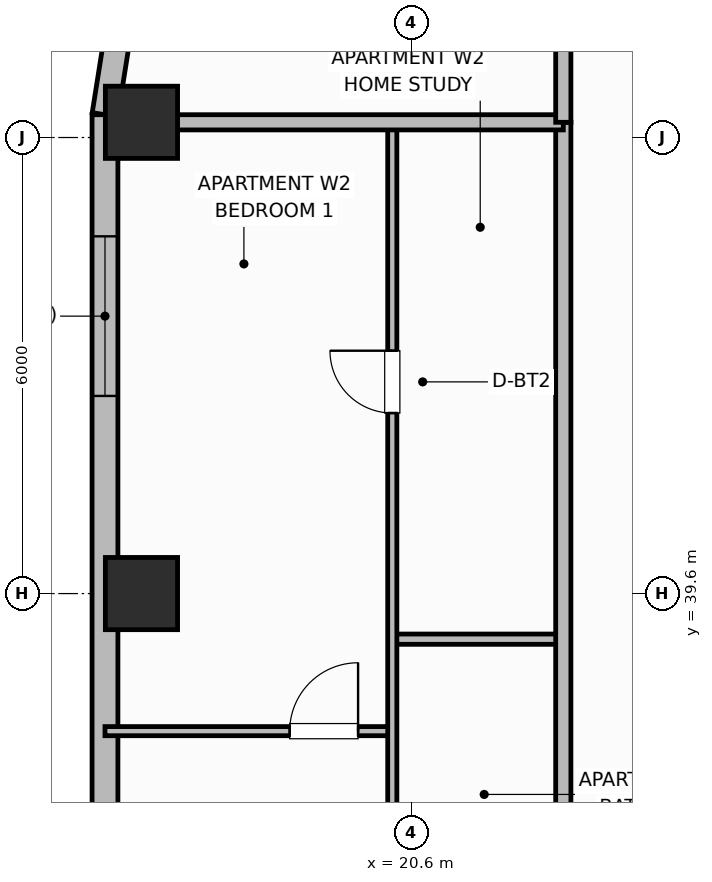
"""IFC4 building model, lengths in metres.
Left out: names, types, materials, properties, quantities, classifications, styles, units other than length and angle.
Written with IfcOpenShell. Run it as: python <this file> out.ifc"""

import sys

from ifc_helpers import new_model, si_unit, direction, frame, frame_2d, origin, origin_2d, place, context, subcontext, project, spatial, rectangle, extrude, element, fill, save


model = new_model("IFC4")
c1 = context("Model", 3, precision=1e-05, world=origin(), true_north=direction((0.0, 1.0)))
c2 = subcontext(c1, "Body", "Model", "MODEL_VIEW")
j1 = project(units=[si_unit("LENGTHUNIT", "METRE"), si_unit("PLANEANGLEUNIT", "RADIAN")], contexts=[c1])
p1 = place(None, origin())
s1 = spatial("IfcSite", under=j1, at=p1, CompositionType="ELEMENT")
p2 = place(p1, origin())
s2 = spatial("IfcBuilding", under=s1, at=p2, CompositionType="ELEMENT")
p3 = place(p2, frame((0.0, 0.0, 181.1)))
s3 = spatial("IfcBuildingStorey", under=s2, at=p3, CompositionType="ELEMENT", Elevation=181.1)
for number, where, z_axis, x_axis in (
    (1, (17.05, 39.6, 0.0), (0.0, 0.0, 1.0), (1.0, 0.0, 0.0)),
    (2, (17.05, 45.8, 0.0), (0.0, 0.0, 1.0), (1.0, 0.0, 0.0)),
):
    element("IfcColumn", number, at=place(p3, frame(where, z_axis=z_axis, x_axis=x_axis)), inside=s3, PredefinedType="COLUMN", context=c2, shape_type="SweptSolid", body=[
        extrude(rectangle(XDim=0.95, YDim=0.95, at=origin_2d()), origin(), (0.0, 0.0, 1.0), 3.7),
    ])
p4 = place(p3, frame((16.748, 47.022, 0.0), z_axis=(0.0, 0.0, 1.0), x_axis=(-0.156481329164, -0.987680916907, 0.0)))
e3 = element("IfcWall", 3, at=p4, inside=s3, PredefinedType="SOLIDWALL", context=c2, shape_type="SweptSolid", body=[
    extrude(rectangle(XDim=1.136, YDim=0.34, at=frame_2d((0.568, 0.0))), origin(), (0.0, 0.0, 1.0), 2.72),
])
p5 = place(p3, frame((16.57, 45.9, 0.0), z_axis=(0.0, 0.0, 1.0), x_axis=(0.0, -1.0, 0.0)))
e4 = element("IfcWall", 4, at=p5, inside=s3, PredefinedType="SOLIDWALL", context=c2, shape_type="SweptSolid", body=[
    extrude(rectangle(XDim=13.3, YDim=0.34, at=frame_2d((6.65, 0.0))), origin(), (0.0, 0.0, 1.0), 2.72),
])
p6 = place(p5, frame((1.6, 0.0, 0.7)))
e5 = element("IfcOpeningElement", 5, at=p6, cuts=e4, PredefinedType="OPENING", context=c2, shape_type="SweptSolid", body=[
    extrude(rectangle(XDim=2.1, YDim=1.9, at=frame_2d((1.05, 0.95))), frame((0.0, 0.18, 0.0), z_axis=(0.0, -1.0, 0.0), x_axis=(1.0, 0.0, 0.0)), (0.0, 0.0, 1.0), 0.36),
])
p7 = place(p5, frame((9.6, 0.0, 0.7)))
e6 = element("IfcOpeningElement", 6, at=p7, cuts=e4, PredefinedType="OPENING", context=c2, shape_type="SweptSolid", body=[
    extrude(rectangle(XDim=2.1, YDim=1.9, at=frame_2d((1.05, 0.95))), frame((0.0, 0.18, 0.0), z_axis=(0.0, -1.0, 0.0), x_axis=(1.0, 0.0, 0.0)), (0.0, 0.0, 1.0), 0.36),
])
p8 = place(p3, frame((20.35, 39.0, 0.0), z_axis=(0.0, 0.0, 1.0), x_axis=(1.0, 0.0, 0.0)))
e7 = element("IfcWall", 7, at=p8, inside=s3, PredefinedType="PARTITIONING", context=c2, shape_type="SweptSolid", body=[
    extrude(rectangle(XDim=2.25, YDim=0.135, at=frame_2d((1.125, 0.0))), origin(), (0.0, 0.0, 1.0), 2.55),
])
p9 = place(p3, frame((16.57, 37.79, 0.0), z_axis=(0.0, 0.0, 1.0), x_axis=(1.0, 0.0, 0.0)))
e8 = element("IfcWall", 8, at=p9, inside=s3, PredefinedType="PARTITIONING", context=c2, shape_type="SweptSolid", body=[
    extrude(rectangle(XDim=3.78, YDim=0.12, at=frame_2d((1.89, 0.0))), origin(), (0.0, 0.0, 1.0), 2.55),
])
p10 = place(p9, frame((2.43, 0.0, 0.0)))
e9 = element("IfcOpeningElement", 9, at=p10, cuts=e8, PredefinedType="OPENING", context=c2, shape_type="SweptSolid", body=[
    extrude(rectangle(XDim=0.9, YDim=2.1, at=frame_2d((0.45, 1.05))), frame((0.0, 0.07, 0.0), z_axis=(0.0, -1.0, 0.0), x_axis=(1.0, 0.0, 0.0)), (0.0, 0.0, 1.0), 0.14),
])
p11 = place(p3, frame((20.35, 29.84, 0.0), z_axis=(0.0, 0.0, 1.0), x_axis=(0.0, 1.0, 0.0)))
e10 = element("IfcWall", 10, at=p11, inside=s3, PredefinedType="PARTITIONING", context=c2, shape_type="SweptSolid", body=[
    extrude(rectangle(XDim=15.92, YDim=0.12, at=frame_2d((7.96, 0.0))), origin(), (0.0, 0.0, 1.0), 2.55),
])
p12 = place(p11, frame((0.61, 0.0, 0.0)))
e11 = element("IfcOpeningElement", 11, at=p12, cuts=e10, PredefinedType="OPENING", context=c2, shape_type="SweptSolid", body=[
    extrude(rectangle(XDim=0.9, YDim=2.1, at=frame_2d((0.45, 1.05))), frame((0.0, 0.07, 0.0), z_axis=(0.0, -1.0, 0.0), x_axis=(1.0, 0.0, 0.0)), (0.0, 0.0, 1.0), 0.14),
])
p13 = place(p11, frame((12.135, 0.0, 0.0)))
e12 = element("IfcOpeningElement", 12, at=p13, cuts=e10, PredefinedType="OPENING", context=c2, shape_type="SweptSolid", body=[
    extrude(rectangle(XDim=0.82, YDim=2.08, at=frame_2d((0.41, 1.04))), frame((0.0, 0.07, 0.0), z_axis=(0.0, -1.0, 0.0), x_axis=(1.0, 0.0, 0.0)), (0.0, 0.0, 1.0), 0.14),
])
p14 = place(p3, frame((22.6, 10.6, 0.0), z_axis=(0.0, 0.0, 1.0), x_axis=(0.0, 1.0, 0.0)))
e13 = element("IfcWall", 13, at=p14, inside=s3, PredefinedType="PARTITIONING", context=c2, shape_type="SweptSolid", body=[
    extrude(rectangle(XDim=35.2, YDim=0.2, at=frame_2d((17.6, 0.0))), origin(), (0.0, 0.0, 1.0), 2.55),
])
p15 = place(p14, frame((2.65, 0.0, 0.0)))
e14 = element("IfcOpeningElement", 14, at=p15, cuts=e13, PredefinedType="OPENING", context=c2, shape_type="SweptSolid", body=[
    extrude(rectangle(XDim=1.0, YDim=2.15, at=frame_2d((0.5, 1.075))), frame((0.0, 0.11, 0.0), z_axis=(0.0, -1.0, 0.0), x_axis=(1.0, 0.0, 0.0)), (0.0, 0.0, 1.0), 0.22),
])
p16 = place(p14, frame((22.75, 0.0, 0.0)))
e15 = element("IfcOpeningElement", 15, at=p16, cuts=e13, PredefinedType="OPENING", context=c2, shape_type="SweptSolid", body=[
    extrude(rectangle(XDim=1.0, YDim=2.15, at=frame_2d((0.5, 1.075))), frame((0.0, 0.11, 0.0), z_axis=(0.0, -1.0, 0.0), x_axis=(1.0, 0.0, 0.0)), (0.0, 0.0, 1.0), 0.22),
])
p17 = place(p3, frame((16.99, 45.8, 0.0), z_axis=(0.0, 0.0, 1.0), x_axis=(1.0, 0.0, 0.0)))
e16 = element("IfcWall", 16, at=p17, inside=s3, PredefinedType="PARTITIONING", context=c2, shape_type="SweptSolid", body=[
    extrude(rectangle(XDim=5.61, YDim=0.2, at=frame_2d((2.805, 0.0))), origin(), (0.0, 0.0, 1.0), 2.55),
])
p18 = place(p3, frame((22.6, 45.8, 0.0), z_axis=(0.0, 0.0, 1.0), x_axis=(0.0, 1.0, 0.0)))
e17 = element("IfcWall", 17, at=p18, inside=s3, PredefinedType="PARTITIONING", context=c2, shape_type="SweptSolid", body=[
    extrude(rectangle(XDim=3.73, YDim=0.2, at=frame_2d((1.865, 0.0))), origin(), (0.0, 0.0, 1.0), 2.55),
])
p19 = place(p6, origin())
e18 = element("IfcWindow", 18, at=p19, inside=s3, PartitioningType="SINGLE_PANEL", PredefinedType="WINDOW", context=c2, shape_type="SweptSolid", body=[
    extrude(rectangle(XDim=2.1, YDim=1.9, at=frame_2d((1.05, 0.95))), frame((0.0, 0.03, 0.0), z_axis=(0.0, -1.0, 0.0), x_axis=(1.0, 0.0, 0.0)), (0.0, 0.0, 1.0), 0.06),
])
fill(e5, e18)
p20 = place(p10, origin())
e19 = element("IfcDoor", 19, at=p20, inside=s3, OperationType="SINGLE_SWING_RIGHT", PredefinedType="DOOR", context=c2, shape_type="SweptSolid", body=[
    extrude(rectangle(XDim=0.9, YDim=2.1, at=frame_2d((0.45, 1.05))), frame((0.0, 0.025, 0.0), z_axis=(0.0, -1.0, 0.0), x_axis=(1.0, 0.0, 0.0)), (0.0, 0.0, 1.0), 0.05),
])
fill(e9, e19)
p21 = place(p13, origin())
e20 = element("IfcDoor", 20, at=p21, inside=s3, OperationType="SINGLE_SWING_RIGHT", PredefinedType="DOOR", context=c2, shape_type="SweptSolid", body=[
    extrude(rectangle(XDim=0.82, YDim=2.08, at=frame_2d((0.41, 1.04))), frame((0.0, 0.025, 0.0), z_axis=(0.0, -1.0, 0.0), x_axis=(1.0, 0.0, 0.0)), (0.0, 0.0, 1.0), 0.05),
])
fill(e12, e20)
save(model, sys.argv[1])
